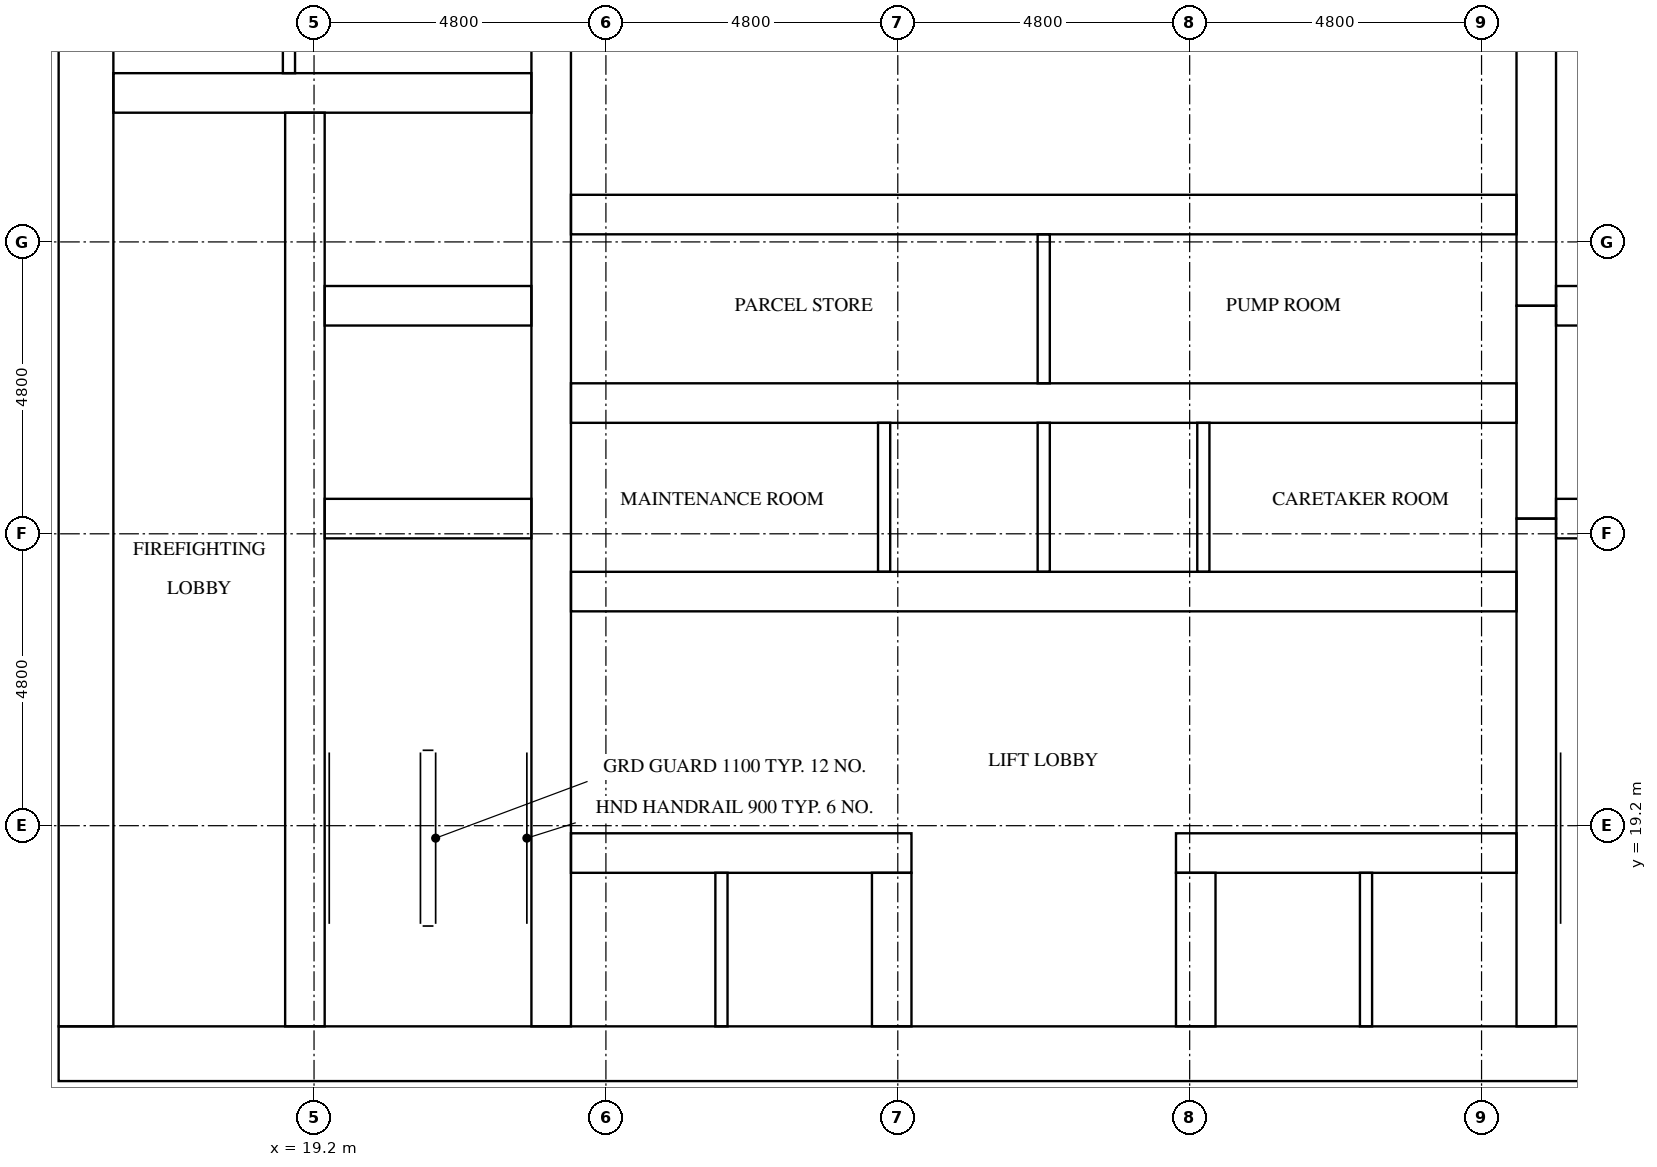
"""IFC4 building model, lengths in metres.
Left out: names, types, materials, properties, quantities, classifications, styles, units other than length and angle.
Written with IfcOpenShell. Run it as: python <this file> out.ifc"""

import sys

from ifc_helpers import new_model, si_unit, direction, frame, frame_2d, origin, place, context, subcontext, project, spatial, rectangle, extrude, element, fill, save


model = new_model("IFC4")
c1 = context("Model", 3, precision=1e-05, world=origin(), true_north=direction((0.0, 1.0)))
c2 = subcontext(c1, "Body", "Model", "MODEL_VIEW")
j1 = project(units=[si_unit("LENGTHUNIT", "METRE"), si_unit("PLANEANGLEUNIT", "RADIAN")], contexts=[c1])
p1 = place(None, origin())
s1 = spatial("IfcSite", under=j1, at=p1, CompositionType="ELEMENT")
p2 = place(p1, origin())
s2 = spatial("IfcBuilding", under=s1, at=p2, CompositionType="ELEMENT")
p3 = place(p2, frame((0.0, 0.0, 106.7)))
s3 = spatial("IfcBuildingStorey", under=s2, at=p3, CompositionType="ELEMENT", Elevation=106.7)
p4 = place(p3, frame((15.0, 15.45, 0.0), z_axis=(0.0, 0.0, 1.0), x_axis=(1.0, 0.0, 0.0)))
e1 = element("IfcWall", 1, at=p4, inside=s3, PredefinedType="SHEAR", context=c2, shape_type="SweptSolid", body=[
    extrude(rectangle(XDim=32.4, YDim=0.9, at=frame_2d((16.2, 0.0))), origin(), (0.0, 0.0, 1.0), 3.2),
])
p5 = place(p4, frame((15.3, 0.0, 0.0)))
e2 = element("IfcOpeningElement", 2, at=p5, cuts=e1, PredefinedType="OPENING", context=c2, shape_type="SweptSolid", body=[
    extrude(rectangle(XDim=1.8, YDim=2.1, at=frame_2d((0.9, 1.05))), frame((0.0, 0.46, 0.0), z_axis=(0.0, -1.0, 0.0), x_axis=(1.0, 0.0, 0.0)), (0.0, 0.0, 1.0), 0.92),
])
p6 = place(p3, frame((15.45, 15.9, 0.0), z_axis=(0.0, 0.0, 1.0), x_axis=(0.0, 1.0, 0.0)))
e3 = element("IfcWall", 3, at=p6, inside=s3, PredefinedType="SHEAR", context=c2, shape_type="SweptSolid", body=[
    extrude(rectangle(XDim=21.0, YDim=0.9, at=frame_2d((10.5, 0.0))), origin(), (0.0, 0.0, 1.0), 3.2),
])
p7 = place(p6, frame((4.86, 0.0, 0.0)))
e4 = element("IfcOpeningElement", 4, at=p7, cuts=e3, PredefinedType="OPENING", context=c2, shape_type="SweptSolid", body=[
    extrude(rectangle(XDim=1.2, YDim=2.1, at=frame_2d((0.6, 1.05))), frame((0.0, 0.46, 0.0), z_axis=(0.0, -1.0, 0.0), x_axis=(1.0, 0.0, 0.0)), (0.0, 0.0, 1.0), 0.92),
])
p8 = place(p3, frame((19.05, 15.9, 0.0), z_axis=(0.0, 0.0, 1.0), x_axis=(0.0, 1.0, 0.0)))
e5 = element("IfcWall", 5, at=p8, inside=s3, PredefinedType="SHEAR", context=c2, shape_type="SweptSolid", body=[
    extrude(rectangle(XDim=15.025, YDim=0.65, at=frame_2d((7.513, 0.0))), origin(), (0.0, 0.0, 1.0), 3.2),
])
p9 = place(p8, frame((9.55, 0.0, 0.0)))
e6 = element("IfcOpeningElement", 6, at=p9, cuts=e5, PredefinedType="OPENING", context=c2, shape_type="SweptSolid", body=[
    extrude(rectangle(XDim=1.1, YDim=2.1, at=frame_2d((0.55, 1.05))), frame((0.0, 0.335, 0.0), z_axis=(0.0, -1.0, 0.0), x_axis=(1.0, 0.0, 0.0)), (0.0, 0.0, 1.0), 0.67),
])
p10 = place(p8, frame((13.05, 0.0, 0.0)))
e7 = element("IfcOpeningElement", 7, at=p10, cuts=e5, PredefinedType="OPENING", context=c2, shape_type="SweptSolid", body=[
    extrude(rectangle(XDim=1.1, YDim=2.1, at=frame_2d((0.55, 1.05))), frame((0.0, 0.335, 0.0), z_axis=(0.0, -1.0, 0.0), x_axis=(1.0, 0.0, 0.0)), (0.0, 0.0, 1.0), 0.67),
])
p11 = place(p8, frame((0.3, 0.0, 0.0)))
e8 = element("IfcOpeningElement", 8, at=p11, cuts=e5, PredefinedType="OPENING", context=c2, shape_type="SweptSolid", body=[
    extrude(rectangle(XDim=1.2, YDim=2.1, at=frame_2d((0.6, 1.05))), frame((0.0, 0.335, 0.0), z_axis=(0.0, -1.0, 0.0), x_axis=(1.0, 0.0, 0.0)), (0.0, 0.0, 1.0), 0.67),
])
p12 = place(p3, frame((23.1, 15.9, 0.0), z_axis=(0.0, 0.0, 1.0), x_axis=(0.0, 1.0, 0.0)))
e9 = element("IfcWall", 9, at=p12, inside=s3, PredefinedType="SHEAR", context=c2, shape_type="SweptSolid", body=[
    extrude(rectangle(XDim=21.0, YDim=0.65, at=frame_2d((10.5, 0.0))), origin(), (0.0, 0.0, 1.0), 3.2),
])
p13 = place(p3, frame((39.3, 15.9, 0.0), z_axis=(0.0, 0.0, 1.0), x_axis=(0.0, 1.0, 0.0)))
e10 = element("IfcWall", 10, at=p13, inside=s3, PredefinedType="SHEAR", context=c2, shape_type="SweptSolid", body=[
    extrude(rectangle(XDim=8.35, YDim=0.65, at=frame_2d((4.175, 0.0))), origin(), (0.0, 0.0, 1.0), 3.2),
])
p14 = place(p3, frame((39.3, 24.25, 0.0), z_axis=(0.0, 0.0, 1.0), x_axis=(0.0, 1.0, 0.0)))
e11 = element("IfcWall", 11, at=p14, inside=s3, PredefinedType="SHEAR", context=c2, shape_type="SweptSolid", body=[
    extrude(rectangle(XDim=3.5, YDim=0.65, at=frame_2d((1.75, 0.0))), origin(), (0.0, 0.0, 1.0), 3.2),
])
p15 = place(p3, frame((39.3, 27.75, 0.0), z_axis=(0.0, 0.0, 1.0), x_axis=(0.0, 1.0, 0.0)))
e12 = element("IfcWall", 12, at=p15, inside=s3, PredefinedType="SHEAR", context=c2, shape_type="SweptSolid", body=[
    extrude(rectangle(XDim=9.15, YDim=0.65, at=frame_2d((4.575, 0.0))), origin(), (0.0, 0.0, 1.0), 3.2),
])
for number, where, z_axis, x_axis in (
    (13, (19.375, 24.25, 0.0), (0.0, 0.0, 1.0), (1.0, 0.0, 0.0)),
    (14, (19.375, 27.75, 0.0), (0.0, 0.0, 1.0), (1.0, 0.0, 0.0)),
):
    element("IfcWall", number, at=place(p3, frame(where, z_axis=z_axis, x_axis=x_axis)), inside=s3, PredefinedType="SHEAR", context=c2, shape_type="SweptSolid", body=[
        extrude(rectangle(XDim=3.4, YDim=0.65, at=frame_2d((1.7, 0.0))), origin(), (0.0, 0.0, 1.0), 3.2),
    ])
p16 = place(p3, frame((15.9, 31.25, 0.0), z_axis=(0.0, 0.0, 1.0), x_axis=(1.0, 0.0, 0.0)))
e15 = element("IfcWall", 15, at=p16, inside=s3, PredefinedType="SHEAR", context=c2, shape_type="SweptSolid", body=[
    extrude(rectangle(XDim=6.875, YDim=0.65, at=frame_2d((3.438, 0.0))), origin(), (0.0, 0.0, 1.0), 3.2),
])
for number, where, z_axis, x_axis in (
    (16, (39.625, 24.25, 0.0), (0.0, 0.0, 1.0), (1.0, 0.0, 0.0)),
    (17, (39.625, 27.75, 0.0), (0.0, 0.0, 1.0), (1.0, 0.0, 0.0)),
):
    element("IfcWall", number, at=place(p3, frame(where, z_axis=z_axis, x_axis=x_axis)), inside=s3, PredefinedType="SHEAR", context=c2, shape_type="SweptSolid", body=[
        extrude(rectangle(XDim=3.4, YDim=0.65, at=frame_2d((1.7, 0.0))), origin(), (0.0, 0.0, 1.0), 3.2),
    ])
p17 = place(p3, frame((23.425, 18.75, 0.0), z_axis=(0.0, 0.0, 1.0), x_axis=(1.0, 0.0, 0.0)))
e18 = element("IfcWall", 18, at=p17, inside=s3, PredefinedType="SHEAR", context=c2, shape_type="SweptSolid", body=[
    extrude(rectangle(XDim=5.6, YDim=0.65, at=frame_2d((2.8, 0.0))), origin(), (0.0, 0.0, 1.0), 3.2),
])
p18 = place(p17, frame((0.637, 0.0, 0.0)))
e19 = element("IfcOpeningElement", 19, at=p18, cuts=e18, PredefinedType="OPENING", context=c2, shape_type="SweptSolid", body=[
    extrude(rectangle(XDim=1.1, YDim=2.1, at=frame_2d((0.55, 1.05))), frame((0.0, 0.335, 0.0), z_axis=(0.0, -1.0, 0.0), x_axis=(1.0, 0.0, 0.0)), (0.0, 0.0, 1.0), 0.67),
])
p19 = place(p17, frame((3.212, 0.0, 0.0)))
e20 = element("IfcOpeningElement", 20, at=p19, cuts=e18, PredefinedType="OPENING", context=c2, shape_type="SweptSolid", body=[
    extrude(rectangle(XDim=1.1, YDim=2.1, at=frame_2d((0.55, 1.05))), frame((0.0, 0.335, 0.0), z_axis=(0.0, -1.0, 0.0), x_axis=(1.0, 0.0, 0.0)), (0.0, 0.0, 1.0), 0.67),
])
p20 = place(p3, frame((33.375, 18.75, 0.0), z_axis=(0.0, 0.0, 1.0), x_axis=(1.0, 0.0, 0.0)))
e21 = element("IfcWall", 21, at=p20, inside=s3, PredefinedType="SHEAR", context=c2, shape_type="SweptSolid", body=[
    extrude(rectangle(XDim=5.6, YDim=0.65, at=frame_2d((2.8, 0.0))), origin(), (0.0, 0.0, 1.0), 3.2),
])
p21 = place(p20, frame((1.288, 0.0, 0.0)))
e22 = element("IfcOpeningElement", 22, at=p21, cuts=e21, PredefinedType="OPENING", context=c2, shape_type="SweptSolid", body=[
    extrude(rectangle(XDim=1.1, YDim=2.1, at=frame_2d((0.55, 1.05))), frame((0.0, 0.335, 0.0), z_axis=(0.0, -1.0, 0.0), x_axis=(1.0, 0.0, 0.0)), (0.0, 0.0, 1.0), 0.67),
])
p22 = place(p20, frame((3.863, 0.0, 0.0)))
e23 = element("IfcOpeningElement", 23, at=p22, cuts=e21, PredefinedType="OPENING", context=c2, shape_type="SweptSolid", body=[
    extrude(rectangle(XDim=1.1, YDim=2.1, at=frame_2d((0.55, 1.05))), frame((0.0, 0.335, 0.0), z_axis=(0.0, -1.0, 0.0), x_axis=(1.0, 0.0, 0.0)), (0.0, 0.0, 1.0), 0.67),
])
p23 = place(p3, frame((23.425, 23.05, 0.0), z_axis=(0.0, 0.0, 1.0), x_axis=(1.0, 0.0, 0.0)))
e24 = element("IfcWall", 24, at=p23, inside=s3, PredefinedType="SHEAR", context=c2, shape_type="SweptSolid", body=[
    extrude(rectangle(XDim=15.55, YDim=0.65, at=frame_2d((7.775, 0.0))), origin(), (0.0, 0.0, 1.0), 3.2),
])
p24 = place(p23, frame((2.025, 0.0, 0.0)))
e25 = element("IfcOpeningElement", 25, at=p24, cuts=e24, PredefinedType="OPENING", context=c2, shape_type="SweptSolid", body=[
    extrude(rectangle(XDim=1.0, YDim=2.1, at=frame_2d((0.5, 1.05))), frame((0.0, 0.335, 0.0), z_axis=(0.0, -1.0, 0.0), x_axis=(1.0, 0.0, 0.0)), (0.0, 0.0, 1.0), 0.67),
])
p25 = place(p23, frame((12.525, 0.0, 0.0)))
e26 = element("IfcOpeningElement", 26, at=p25, cuts=e24, PredefinedType="OPENING", context=c2, shape_type="SweptSolid", body=[
    extrude(rectangle(XDim=1.0, YDim=2.1, at=frame_2d((0.5, 1.05))), frame((0.0, 0.335, 0.0), z_axis=(0.0, -1.0, 0.0), x_axis=(1.0, 0.0, 0.0)), (0.0, 0.0, 1.0), 0.67),
])
p26 = place(p3, frame((23.425, 26.15, 0.0), z_axis=(0.0, 0.0, 1.0), x_axis=(1.0, 0.0, 0.0)))
e27 = element("IfcWall", 27, at=p26, inside=s3, PredefinedType="SHEAR", context=c2, shape_type="SweptSolid", body=[
    extrude(rectangle(XDim=15.55, YDim=0.65, at=frame_2d((7.775, 0.0))), origin(), (0.0, 0.0, 1.0), 3.2),
])
p27 = place(p3, frame((23.425, 29.25, 0.0), z_axis=(0.0, 0.0, 1.0), x_axis=(1.0, 0.0, 0.0)))
e28 = element("IfcWall", 28, at=p27, inside=s3, PredefinedType="SHEAR", context=c2, shape_type="SweptSolid", body=[
    extrude(rectangle(XDim=15.55, YDim=0.65, at=frame_2d((7.775, 0.0))), origin(), (0.0, 0.0, 1.0), 3.2),
])
p28 = place(p27, frame((3.337, 0.0, 0.0)))
e29 = element("IfcOpeningElement", 29, at=p28, cuts=e28, PredefinedType="OPENING", context=c2, shape_type="SweptSolid", body=[
    extrude(rectangle(XDim=1.0, YDim=2.1, at=frame_2d((0.5, 1.05))), frame((0.0, 0.335, 0.0), z_axis=(0.0, -1.0, 0.0), x_axis=(1.0, 0.0, 0.0)), (0.0, 0.0, 1.0), 0.67),
])
p29 = place(p27, frame((11.212, 0.0, 0.0)))
e30 = element("IfcOpeningElement", 30, at=p29, cuts=e28, PredefinedType="OPENING", context=c2, shape_type="SweptSolid", body=[
    extrude(rectangle(XDim=1.0, YDim=2.1, at=frame_2d((0.5, 1.05))), frame((0.0, 0.335, 0.0), z_axis=(0.0, -1.0, 0.0), x_axis=(1.0, 0.0, 0.0)), (0.0, 0.0, 1.0), 0.67),
])
for number, where, z_axis, x_axis in (
    (31, (28.7, 15.9, 0.0), (0.0, 0.0, 1.0), (0.0, 1.0, 0.0)),
    (32, (33.7, 15.9, 0.0), (0.0, 0.0, 1.0), (0.0, 1.0, 0.0)),
):
    element("IfcWall", number, at=place(p3, frame(where, z_axis=z_axis, x_axis=x_axis)), inside=s3, PredefinedType="SHEAR", context=c2, shape_type="SweptSolid", body=[
        extrude(rectangle(XDim=2.525, YDim=0.65, at=frame_2d((1.263, 0.0))), origin(), (0.0, 0.0, 1.0), 3.2),
    ])
for number, where, z_axis, x_axis in (
    (33, (28.575, 23.375, 0.0), (0.0, 0.0, 1.0), (0.0, 1.0, 0.0)),
    (34, (31.2, 23.375, 0.0), (0.0, 0.0, 1.0), (0.0, 1.0, 0.0)),
    (35, (33.825, 23.375, 0.0), (0.0, 0.0, 1.0), (0.0, 1.0, 0.0)),
):
    element("IfcWall", number, at=place(p3, frame(where, z_axis=z_axis, x_axis=x_axis)), inside=s3, PredefinedType="SOLIDWALL", context=c2, shape_type="SweptSolid", body=[
        extrude(rectangle(XDim=2.45, YDim=0.2, at=frame_2d((1.225, 0.0))), origin(), (0.0, 0.0, 1.0), 3.2),
    ])
for number, where, z_axis, x_axis in (
    (36, (25.9, 15.9, 0.0), (0.0, 0.0, 1.0), (0.0, 1.0, 0.0)),
    (37, (36.5, 15.9, 0.0), (0.0, 0.0, 1.0), (0.0, 1.0, 0.0)),
):
    element("IfcWall", number, at=place(p3, frame(where, z_axis=z_axis, x_axis=x_axis)), inside=s3, PredefinedType="SOLIDWALL", context=c2, shape_type="SweptSolid", body=[
        extrude(rectangle(XDim=2.525, YDim=0.2, at=frame_2d((1.263, 0.0))), origin(), (0.0, 0.0, 1.0), 3.2),
    ])
p30 = place(p3, frame((18.788, 31.575, 0.0), z_axis=(0.0, 0.0, 1.0), x_axis=(0.0, 1.0, 0.0)))
e38 = element("IfcWall", 38, at=p30, inside=s3, PredefinedType="PARTITIONING", context=c2, shape_type="SweptSolid", body=[
    extrude(rectangle(XDim=5.325, YDim=0.2, at=frame_2d((2.663, 0.0))), origin(), (0.0, 0.0, 1.0), 3.2),
])
p31 = place(p3, frame((31.2, 26.475, 0.0), z_axis=(0.0, 0.0, 1.0), x_axis=(0.0, 1.0, 0.0)))
e39 = element("IfcWall", 39, at=p31, inside=s3, PredefinedType="PARTITIONING", context=c2, shape_type="SweptSolid", body=[
    extrude(rectangle(XDim=2.45, YDim=0.2, at=frame_2d((1.225, 0.0))), origin(), (0.0, 0.0, 1.0), 3.2),
])
p32 = place(p18, origin())
e40 = element("IfcDoor", 40, at=p32, inside=s3, OperationType="DOUBLE_DOOR_SLIDING", PredefinedType="DOOR", context=c2, shape_type="SweptSolid", body=[
    extrude(rectangle(XDim=1.1, YDim=2.1, at=frame_2d((0.55, 1.05))), frame((0.0, 0.025, 0.0), z_axis=(0.0, -1.0, 0.0), x_axis=(1.0, 0.0, 0.0)), (0.0, 0.0, 1.0), 0.05),
])
fill(e19, e40)
p33 = place(p19, origin())
e41 = element("IfcDoor", 41, at=p33, inside=s3, OperationType="DOUBLE_DOOR_SLIDING", PredefinedType="DOOR", context=c2, shape_type="SweptSolid", body=[
    extrude(rectangle(XDim=1.1, YDim=2.1, at=frame_2d((0.55, 1.05))), frame((0.0, 0.025, 0.0), z_axis=(0.0, -1.0, 0.0), x_axis=(1.0, 0.0, 0.0)), (0.0, 0.0, 1.0), 0.05),
])
fill(e20, e41)
p34 = place(p21, origin())
e42 = element("IfcDoor", 42, at=p34, inside=s3, OperationType="DOUBLE_DOOR_SLIDING", PredefinedType="DOOR", context=c2, shape_type="SweptSolid", body=[
    extrude(rectangle(XDim=1.1, YDim=2.1, at=frame_2d((0.55, 1.05))), frame((0.0, 0.025, 0.0), z_axis=(0.0, -1.0, 0.0), x_axis=(1.0, 0.0, 0.0)), (0.0, 0.0, 1.0), 0.05),
])
fill(e22, e42)
p35 = place(p22, origin())
e43 = element("IfcDoor", 43, at=p35, inside=s3, OperationType="DOUBLE_DOOR_SLIDING", PredefinedType="DOOR", context=c2, shape_type="SweptSolid", body=[
    extrude(rectangle(XDim=1.1, YDim=2.1, at=frame_2d((0.55, 1.05))), frame((0.0, 0.025, 0.0), z_axis=(0.0, -1.0, 0.0), x_axis=(1.0, 0.0, 0.0)), (0.0, 0.0, 1.0), 0.05),
])
fill(e23, e43)
p36 = place(p9, origin())
e44 = element("IfcDoor", 44, at=p36, inside=s3, OperationType="DOUBLE_DOOR_SLIDING", PredefinedType="DOOR", context=c2, shape_type="SweptSolid", body=[
    extrude(rectangle(XDim=1.1, YDim=2.1, at=frame_2d((0.55, 1.05))), frame((0.0, 0.025, 0.0), z_axis=(0.0, -1.0, 0.0), x_axis=(1.0, 0.0, 0.0)), (0.0, 0.0, 1.0), 0.05),
])
fill(e6, e44)
p37 = place(p10, origin())
e45 = element("IfcDoor", 45, at=p37, inside=s3, OperationType="DOUBLE_DOOR_SLIDING", PredefinedType="DOOR", context=c2, shape_type="SweptSolid", body=[
    extrude(rectangle(XDim=1.1, YDim=2.1, at=frame_2d((0.55, 1.05))), frame((0.0, 0.025, 0.0), z_axis=(0.0, -1.0, 0.0), x_axis=(1.0, 0.0, 0.0)), (0.0, 0.0, 1.0), 0.05),
])
fill(e7, e45)
p38 = place(p11, frame((1.2, 0.0, 0.0), z_axis=(0.0, 0.0, 1.0), x_axis=(-1.0, 0.0, 0.0)))
e46 = element("IfcDoor", 46, at=p38, inside=s3, OperationType="SINGLE_SWING_LEFT", PredefinedType="DOOR", context=c2, shape_type="SweptSolid", body=[
    extrude(rectangle(XDim=1.2, YDim=2.1, at=frame_2d((0.6, 1.05))), frame((0.0, 0.025, 0.0), z_axis=(0.0, -1.0, 0.0), x_axis=(1.0, 0.0, 0.0)), (0.0, 0.0, 1.0), 0.05),
])
fill(e8, e46)
p39 = place(p5, frame((1.8, 0.0, 0.0), z_axis=(0.0, 0.0, 1.0), x_axis=(-1.0, 0.0, 0.0)))
e47 = element("IfcDoor", 47, at=p39, inside=s3, OperationType="DOUBLE_DOOR_SINGLE_SWING", PredefinedType="DOOR", context=c2, shape_type="SweptSolid", body=[
    extrude(rectangle(XDim=1.8, YDim=2.1, at=frame_2d((0.9, 1.05))), frame((0.0, 0.025, 0.0), z_axis=(0.0, -1.0, 0.0), x_axis=(1.0, 0.0, 0.0)), (0.0, 0.0, 1.0), 0.05),
])
fill(e2, e47)
p40 = place(p7, frame((1.2, 0.0, 0.0), z_axis=(0.0, 0.0, 1.0), x_axis=(-1.0, 0.0, 0.0)))
e48 = element("IfcDoor", 48, at=p40, inside=s3, OperationType="SINGLE_SWING_RIGHT", PredefinedType="DOOR", context=c2, shape_type="SweptSolid", body=[
    extrude(rectangle(XDim=1.2, YDim=2.1, at=frame_2d((0.6, 1.05))), frame((0.0, 0.025, 0.0), z_axis=(0.0, -1.0, 0.0), x_axis=(1.0, 0.0, 0.0)), (0.0, 0.0, 1.0), 0.05),
])
fill(e4, e48)
p41 = place(p24, frame((1.0, 0.0, 0.0), z_axis=(0.0, 0.0, 1.0), x_axis=(-1.0, 0.0, 0.0)))
e49 = element("IfcDoor", 49, at=p41, inside=s3, OperationType="SINGLE_SWING_RIGHT", PredefinedType="DOOR", context=c2, shape_type="SweptSolid", body=[
    extrude(rectangle(XDim=1.0, YDim=2.1, at=frame_2d((0.5, 1.05))), frame((0.0, 0.025, 0.0), z_axis=(0.0, -1.0, 0.0), x_axis=(1.0, 0.0, 0.0)), (0.0, 0.0, 1.0), 0.05),
])
fill(e25, e49)
p42 = place(p25, frame((1.0, 0.0, 0.0), z_axis=(0.0, 0.0, 1.0), x_axis=(-1.0, 0.0, 0.0)))
e50 = element("IfcDoor", 50, at=p42, inside=s3, OperationType="SINGLE_SWING_LEFT", PredefinedType="DOOR", context=c2, shape_type="SweptSolid", body=[
    extrude(rectangle(XDim=1.0, YDim=2.1, at=frame_2d((0.5, 1.05))), frame((0.0, 0.025, 0.0), z_axis=(0.0, -1.0, 0.0), x_axis=(1.0, 0.0, 0.0)), (0.0, 0.0, 1.0), 0.05),
])
fill(e26, e50)
p43 = place(p28, origin())
e51 = element("IfcDoor", 51, at=p43, inside=s3, OperationType="SINGLE_SWING_RIGHT", PredefinedType="DOOR", context=c2, shape_type="SweptSolid", body=[
    extrude(rectangle(XDim=1.0, YDim=2.1, at=frame_2d((0.5, 1.05))), frame((0.0, 0.025, 0.0), z_axis=(0.0, -1.0, 0.0), x_axis=(1.0, 0.0, 0.0)), (0.0, 0.0, 1.0), 0.05),
])
fill(e29, e51)
p44 = place(p29, origin())
e52 = element("IfcDoor", 52, at=p44, inside=s3, OperationType="SINGLE_SWING_LEFT", PredefinedType="DOOR", context=c2, shape_type="SweptSolid", body=[
    extrude(rectangle(XDim=1.0, YDim=2.1, at=frame_2d((0.5, 1.05))), frame((0.0, 0.025, 0.0), z_axis=(0.0, -1.0, 0.0), x_axis=(1.0, 0.0, 0.0)), (0.0, 0.0, 1.0), 0.05),
])
fill(e30, e52)
save(model, sys.argv[1])
